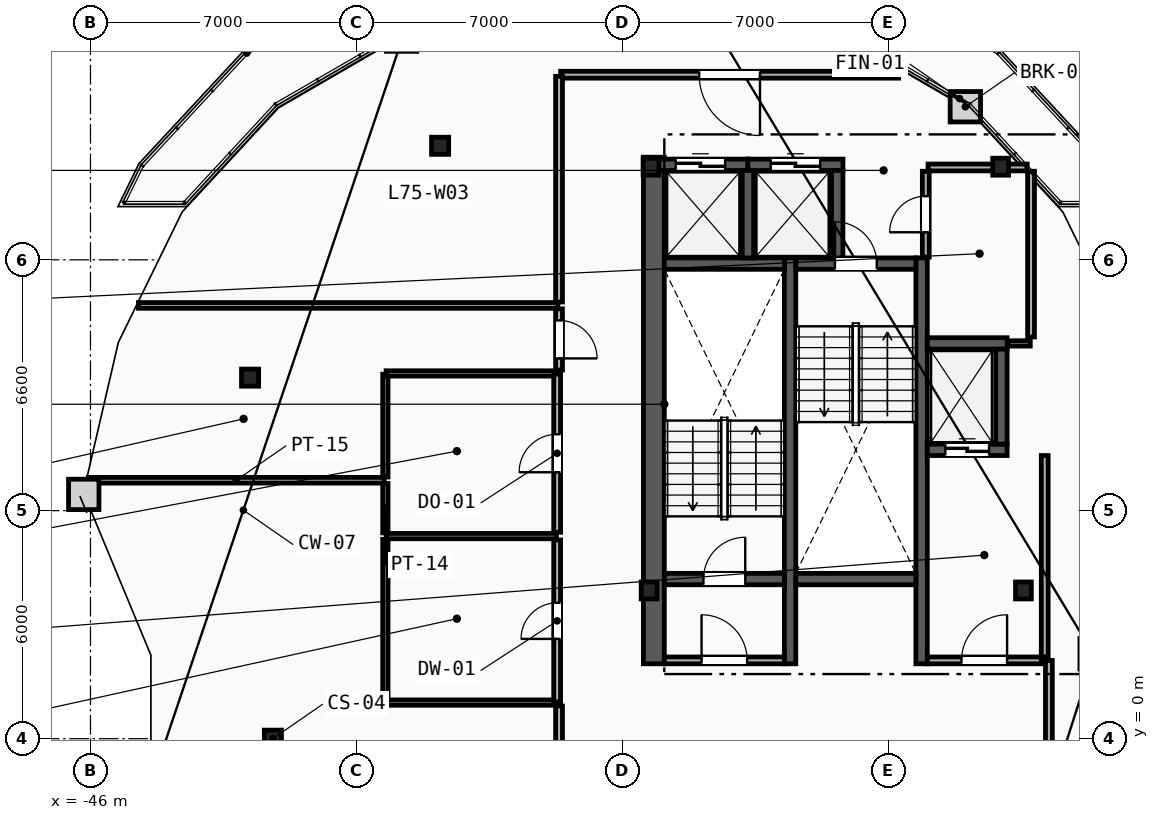
"""IFC4 building model, lengths in metres.
Left out: names, types, materials, properties, quantities, classifications, styles, units other than length and angle.
Written with IfcOpenShell. Run it as: python <this file> out.ifc"""

import sys

from ifc_helpers import new_model, si_unit, direction, frame, frame_2d, origin, origin_2d, place, context, subcontext, project, spatial, rectangle, hollow_rectangle, i_section, extrude, element, fill, save


model = new_model("IFC4")
c1 = context("Model", 3, precision=1e-05, world=origin(), true_north=direction((0.0, 1.0)))
c2 = subcontext(c1, "Body", "Model", "MODEL_VIEW")
j1 = project(units=[si_unit("LENGTHUNIT", "METRE"), si_unit("PLANEANGLEUNIT", "RADIAN")], contexts=[c1])
p1 = place(None, origin())
s1 = spatial("IfcSite", under=j1, at=p1, CompositionType="ELEMENT")
p2 = place(p1, origin())
s2 = spatial("IfcBuilding", under=s1, at=p2, CompositionType="ELEMENT")
p3 = place(p2, frame((0.0, 0.0, 282.8)))
s3 = spatial("IfcBuildingStorey", under=s2, at=p3, CompositionType="ELEMENT", Elevation=282.8)
for number, where, z_axis, x_axis in (
    (1, (-31.3, 3.9, 0.0), (0.0, 0.0, 1.0), (1.0, 0.0, 0.0)),
    (2, (-21.45, 3.9, 0.0), (0.0, 0.0, 1.0), (1.0, 0.0, 0.0)),
    (3, (-22.05, 15.05, 0.0), (0.0, 0.0, 1.0), (1.0, 0.0, 0.0)),
    (4, (-31.25, 15.05, 0.0), (0.0, 0.0, 1.0), (1.0, 0.0, 0.0)),
):
    element("IfcColumn", number, at=place(p3, frame(where, z_axis=z_axis, x_axis=x_axis)), inside=s3, PredefinedType="COLUMN", context=c2, shape_type="SweptSolid", body=[
        extrude(i_section(OverallWidth=0.416, OverallDepth=0.446, WebThickness=0.039, FlangeThickness=0.063, FilletRadius=0.018, at=origin_2d()), origin(), (0.0, 0.0, 1.0), 3.6),
    ])
for number, where, z_axis, x_axis in (
    (5, (-41.2, 0.0, 0.0), (0.0, 0.0, 1.0), (1.0, 0.0, 0.0)),
    (6, (-41.8, 9.5, 0.0), (0.0, 0.0, 1.0), (1.0, 0.0, 0.0)),
    (7, (-36.8, 15.6, 0.0), (0.0, 0.0, 1.0), (1.0, 0.0, 0.0)),
):
    element("IfcColumn", number, at=place(p3, frame(where, z_axis=z_axis, x_axis=x_axis)), inside=s3, PredefinedType="COLUMN", context=c2, shape_type="SweptSolid", body=[
        extrude(hollow_rectangle(XDim=0.45, YDim=0.45, WallThickness=0.025, at=origin_2d()), origin(), (0.0, 0.0, 1.0), 3.6),
    ])
p4 = place(p3, frame((-31.175, 1.97, 0.0), z_axis=(0.0, 0.0, 1.0), x_axis=(0.0, 1.0, 0.0)))
e8 = element("IfcWall", 8, at=p4, inside=s3, PredefinedType="SHEAR", context=c2, shape_type="SweptSolid", body=[
    extrude(rectangle(XDim=13.33, YDim=0.55, at=frame_2d((6.665, 0.0))), origin(), (0.0, 0.0, 1.0), 3.34),
])
for number, where, z_axis, x_axis in (
    (9, (-27.59, 1.97, 0.0), (0.0, 0.0, 1.0), (0.0, 1.0, 0.0)),
    (10, (-24.13, 1.97, 0.0), (0.0, 0.0, 1.0), (0.0, 1.0, 0.0)),
):
    element("IfcWall", number, at=place(p3, frame(where, z_axis=z_axis, x_axis=x_axis)), inside=s3, PredefinedType="SHEAR", context=c2, shape_type="SweptSolid", body=[
        extrude(rectangle(XDim=10.68, YDim=0.3, at=frame_2d((5.34, 0.0))), origin(), (0.0, 0.0, 1.0), 3.34),
    ])
p5 = place(p3, frame((-30.9, 4.2, 0.0), z_axis=(0.0, 0.0, 1.0), x_axis=(1.0, 0.0, 0.0)))
e11 = element("IfcWall", 11, at=p5, inside=s3, PredefinedType="SHEAR", context=c2, shape_type="SweptSolid", body=[
    extrude(rectangle(XDim=3.16, YDim=0.3, at=frame_2d((1.58, 0.0))), origin(), (0.0, 0.0, 1.0), 3.34),
])
p6 = place(p5, frame((1.03, 0.0, 0.0)))
e12 = element("IfcOpeningElement", 12, at=p6, cuts=e11, PredefinedType="OPENING", context=c2, shape_type="SweptSolid", body=[
    extrude(rectangle(XDim=1.1, YDim=2.15, at=frame_2d((0.55, 1.075))), frame((0.0, 0.16, 0.0), z_axis=(0.0, -1.0, 0.0), x_axis=(1.0, 0.0, 0.0)), (0.0, 0.0, 1.0), 0.32),
])
p7 = place(p3, frame((-30.9, 12.5, 0.0), z_axis=(0.0, 0.0, 1.0), x_axis=(1.0, 0.0, 0.0)))
e13 = element("IfcWall", 13, at=p7, inside=s3, PredefinedType="SHEAR", context=c2, shape_type="SweptSolid", body=[
    extrude(rectangle(XDim=3.16, YDim=0.3, at=frame_2d((1.58, 0.0))), origin(), (0.0, 0.0, 1.0), 3.34),
])
p8 = place(p3, frame((-27.44, 12.5, 0.0), z_axis=(0.0, 0.0, 1.0), x_axis=(1.0, 0.0, 0.0)))
e14 = element("IfcWall", 14, at=p8, inside=s3, PredefinedType="SHEAR", context=c2, shape_type="SweptSolid", body=[
    extrude(rectangle(XDim=3.16, YDim=0.3, at=frame_2d((1.58, 0.0))), origin(), (0.0, 0.0, 1.0), 3.34),
])
p9 = place(p8, frame((1.03, 0.0, 0.0)))
e15 = element("IfcOpeningElement", 15, at=p9, cuts=e14, PredefinedType="OPENING", context=c2, shape_type="SweptSolid", body=[
    extrude(rectangle(XDim=1.1, YDim=2.15, at=frame_2d((0.55, 1.075))), frame((0.0, 0.16, 0.0), z_axis=(0.0, -1.0, 0.0), x_axis=(1.0, 0.0, 0.0)), (0.0, 0.0, 1.0), 0.32),
])
p10 = place(p3, frame((-27.44, 4.2, 0.0), z_axis=(0.0, 0.0, 1.0), x_axis=(1.0, 0.0, 0.0)))
e16 = element("IfcWall", 16, at=p10, inside=s3, PredefinedType="SHEAR", context=c2, shape_type="SweptSolid", body=[
    extrude(rectangle(XDim=3.16, YDim=0.3, at=frame_2d((1.58, 0.0))), origin(), (0.0, 0.0, 1.0), 3.34),
])
p11 = place(p3, frame((-20.89, 2.15, 0.0), z_axis=(0.0, 0.0, 1.0), x_axis=(0.0, 1.0, 0.0)))
e17 = element("IfcWall", 17, at=p11, inside=s3, PredefinedType="PARTITIONING", context=c2, shape_type="SweptSolid", body=[
    extrude(rectangle(XDim=5.3, YDim=0.18, at=frame_2d((2.65, 0.0))), origin(), (0.0, 0.0, 1.0), 3.34),
])
p12 = place(p3, frame((-23.98, 2.06, 0.0), z_axis=(0.0, 0.0, 1.0), x_axis=(1.0, 0.0, 0.0)))
e18 = element("IfcWall", 18, at=p12, inside=s3, PredefinedType="PARTITIONING", context=c2, shape_type="SweptSolid", body=[
    extrude(rectangle(XDim=3.0, YDim=0.18, at=frame_2d((1.5, 0.0))), origin(), (0.0, 0.0, 1.0), 3.34),
])
p13 = place(p12, frame((0.9, 0.0, 0.0)))
e19 = element("IfcOpeningElement", 19, at=p13, cuts=e18, PredefinedType="OPENING", context=c2, shape_type="SweptSolid", body=[
    extrude(rectangle(XDim=1.2, YDim=2.15, at=frame_2d((0.6, 1.075))), frame((0.0, 0.1, 0.0), z_axis=(0.0, -1.0, 0.0), x_axis=(1.0, 0.0, 0.0)), (0.0, 0.0, 1.0), 0.2),
])
p14 = place(p3, frame((-30.9, 2.06, 0.0), z_axis=(0.0, 0.0, 1.0), x_axis=(1.0, 0.0, 0.0)))
e20 = element("IfcWall", 20, at=p14, inside=s3, PredefinedType="PARTITIONING", context=c2, shape_type="SweptSolid", body=[
    extrude(rectangle(XDim=3.16, YDim=0.18, at=frame_2d((1.58, 0.0))), origin(), (0.0, 0.0, 1.0), 3.34),
])
p15 = place(p14, frame((0.98, 0.0, 0.0)))
e21 = element("IfcOpeningElement", 21, at=p15, cuts=e20, PredefinedType="OPENING", context=c2, shape_type="SweptSolid", body=[
    extrude(rectangle(XDim=1.2, YDim=2.15, at=frame_2d((0.6, 1.075))), frame((0.0, 0.1, 0.0), z_axis=(0.0, -1.0, 0.0), x_axis=(1.0, 0.0, 0.0)), (0.0, 0.0, 1.0), 0.2),
])
p16 = place(p3, frame((-23.98, 7.6, 0.0), z_axis=(0.0, 0.0, 1.0), x_axis=(1.0, 0.0, 0.0)))
e22 = element("IfcWall", 22, at=p16, inside=s3, PredefinedType="SHEAR", context=c2, shape_type="SweptSolid", body=[
    extrude(rectangle(XDim=2.1, YDim=0.3, at=frame_2d((1.05, 0.0))), origin(), (0.0, 0.0, 1.0), 3.34),
])
p17 = place(p16, frame((0.475, 0.0, 0.0)))
e23 = element("IfcOpeningElement", 23, at=p17, cuts=e22, PredefinedType="OPENING", context=c2, shape_type="SweptSolid", body=[
    extrude(rectangle(XDim=1.15, YDim=2.2, at=frame_2d((0.575, 1.1))), frame((0.0, 0.16, 0.0), z_axis=(0.0, -1.0, 0.0), x_axis=(1.0, 0.0, 0.0)), (0.0, 0.0, 1.0), 0.32),
])
p18 = place(p3, frame((-23.98, 10.4, 0.0), z_axis=(0.0, 0.0, 1.0), x_axis=(1.0, 0.0, 0.0)))
e24 = element("IfcWall", 24, at=p18, inside=s3, PredefinedType="SHEAR", context=c2, shape_type="SweptSolid", body=[
    extrude(rectangle(XDim=2.1, YDim=0.3, at=frame_2d((1.05, 0.0))), origin(), (0.0, 0.0, 1.0), 3.34),
])
p19 = place(p3, frame((-22.03, 7.75, 0.0), z_axis=(0.0, 0.0, 1.0), x_axis=(0.0, 1.0, 0.0)))
e25 = element("IfcWall", 25, at=p19, inside=s3, PredefinedType="SHEAR", context=c2, shape_type="SweptSolid", body=[
    extrude(rectangle(XDim=2.5, YDim=0.3, at=frame_2d((1.25, 0.0))), origin(), (0.0, 0.0, 1.0), 3.34),
])
p20 = place(p3, frame((-31.2, 15.1, 0.0), z_axis=(0.0, 0.0, 1.0), x_axis=(1.0, 0.0, 0.0)))
e26 = element("IfcWall", 26, at=p20, inside=s3, PredefinedType="SHEAR", context=c2, shape_type="SweptSolid", body=[
    extrude(rectangle(XDim=2.5, YDim=0.3, at=frame_2d((1.25, 0.0))), origin(), (0.0, 0.0, 1.0), 3.34),
])
p21 = place(p20, frame((0.6, 0.0, 0.0)))
e27 = element("IfcOpeningElement", 27, at=p21, cuts=e26, PredefinedType="OPENING", context=c2, shape_type="SweptSolid", body=[
    extrude(rectangle(XDim=1.3, YDim=2.2, at=frame_2d((0.65, 1.1))), frame((0.0, 0.16, 0.0), z_axis=(0.0, -1.0, 0.0), x_axis=(1.0, 0.0, 0.0)), (0.0, 0.0, 1.0), 0.32),
])
p22 = place(p3, frame((-28.7, 12.65, 0.0), z_axis=(0.0, 0.0, 1.0), x_axis=(0.0, 1.0, 0.0)))
e28 = element("IfcWall", 28, at=p22, inside=s3, PredefinedType="SHEAR", context=c2, shape_type="SweptSolid", body=[
    extrude(rectangle(XDim=2.3, YDim=0.3, at=frame_2d((1.15, 0.0))), origin(), (0.0, 0.0, 1.0), 3.34),
])
p23 = place(p3, frame((-28.7, 15.1, 0.0), z_axis=(0.0, 0.0, 1.0), x_axis=(1.0, 0.0, 0.0)))
e29 = element("IfcWall", 29, at=p23, inside=s3, PredefinedType="SHEAR", context=c2, shape_type="SweptSolid", body=[
    extrude(rectangle(XDim=2.5, YDim=0.3, at=frame_2d((1.25, 0.0))), origin(), (0.0, 0.0, 1.0), 3.34),
])
p24 = place(p23, frame((0.6, 0.0, 0.0)))
e30 = element("IfcOpeningElement", 30, at=p24, cuts=e29, PredefinedType="OPENING", context=c2, shape_type="SweptSolid", body=[
    extrude(rectangle(XDim=1.3, YDim=2.2, at=frame_2d((0.65, 1.1))), frame((0.0, 0.16, 0.0), z_axis=(0.0, -1.0, 0.0), x_axis=(1.0, 0.0, 0.0)), (0.0, 0.0, 1.0), 0.32),
])
p25 = place(p3, frame((-26.35, 12.65, 0.0), z_axis=(0.0, 0.0, 1.0), x_axis=(0.0, 1.0, 0.0)))
e31 = element("IfcWall", 31, at=p25, inside=s3, PredefinedType="SHEAR", context=c2, shape_type="SweptSolid", body=[
    extrude(rectangle(XDim=2.3, YDim=0.3, at=frame_2d((1.15, 0.0))), origin(), (0.0, 0.0, 1.0), 3.34),
])
p26 = place(p3, frame((-21.86, 10.4, 0.0), z_axis=(0.0, 0.0, 1.0), x_axis=(1.0, 0.0, 0.0)))
e32 = element("IfcWall", 32, at=p26, inside=s3, PredefinedType="PARTITIONING", context=c2, shape_type="SweptSolid", body=[
    extrude(rectangle(XDim=0.59, YDim=0.14, at=frame_2d((0.295, 0.0))), origin(), (0.0, 0.0, 1.0), 3.34),
])
p27 = place(p3, frame((-21.25, 10.57, 0.0), z_axis=(0.0, 0.0, 1.0), x_axis=(0.0, 1.0, 0.0)))
e33 = element("IfcWall", 33, at=p27, inside=s3, PredefinedType="PARTITIONING", context=c2, shape_type="SweptSolid", body=[
    extrude(rectangle(XDim=4.36, YDim=0.18, at=frame_2d((2.18, 0.0))), origin(), (0.0, 0.0, 1.0), 3.34),
])
p28 = place(p3, frame((-23.96, 15.03, 0.0), z_axis=(0.0, 0.0, 1.0), x_axis=(1.0, 0.0, 0.0)))
e34 = element("IfcWall", 34, at=p28, inside=s3, PredefinedType="PARTITIONING", context=c2, shape_type="SweptSolid", body=[
    extrude(rectangle(XDim=2.61, YDim=0.18, at=frame_2d((1.305, 0.0))), origin(), (0.0, 0.0, 1.0), 2.413),
])
p29 = place(p3, frame((-24.02, 12.67, 0.0), z_axis=(0.0, 0.0, 1.0), x_axis=(0.0, 1.0, 0.0)))
e35 = element("IfcWall", 35, at=p29, inside=s3, PredefinedType="PARTITIONING", context=c2, shape_type="SweptSolid", body=[
    extrude(rectangle(XDim=2.26, YDim=0.18, at=frame_2d((1.13, 0.0))), origin(), (0.0, 0.0, 1.0), 3.34),
])
p30 = place(p29, frame((0.655, 0.0, 0.0)))
e36 = element("IfcOpeningElement", 36, at=p30, cuts=e35, PredefinedType="OPENING", context=c2, shape_type="SweptSolid", body=[
    extrude(rectangle(XDim=0.95, YDim=2.1, at=frame_2d((0.475, 1.05))), frame((0.0, 0.1, 0.0), z_axis=(0.0, -1.0, 0.0), x_axis=(1.0, 0.0, 0.0)), (0.0, 0.0, 1.0), 0.2),
])
p31 = place(p3, frame((-38.24, 0.97, 0.0), z_axis=(0.0, 0.0, 1.0), x_axis=(0.0, 1.0, 0.0)))
e37 = element("IfcWall", 37, at=p31, inside=s3, PredefinedType="PARTITIONING", context=c2, shape_type="SweptSolid", body=[
    extrude(rectangle(XDim=4.275, YDim=0.14, at=frame_2d((2.138, 0.0))), origin(), (0.0, 0.0, 1.0), 3.34),
])
p32 = place(p3, frame((-38.24, 5.415, 0.0), z_axis=(0.0, 0.0, 1.0), x_axis=(0.0, 1.0, 0.0)))
e38 = element("IfcWall", 38, at=p32, inside=s3, PredefinedType="PARTITIONING", context=c2, shape_type="SweptSolid", body=[
    extrude(rectangle(XDim=1.3, YDim=0.14, at=frame_2d((0.65, 0.0))), origin(), (0.0, 0.0, 1.0), 3.34),
])
p33 = place(p3, frame((-38.24, 6.885, 0.0), z_axis=(0.0, 0.0, 1.0), x_axis=(0.0, 1.0, 0.0)))
e39 = element("IfcWall", 39, at=p33, inside=s3, PredefinedType="PARTITIONING", context=c2, shape_type="SweptSolid", body=[
    extrude(rectangle(XDim=2.705, YDim=0.14, at=frame_2d((1.353, 0.0))), origin(), (0.0, 0.0, 1.0), 3.34),
])
for number, where, z_axis, x_axis in (
    (40, (-38.22, 0.95, 0.0), (0.0, 0.0, 1.0), (1.0, 0.0, 0.0)),
    (41, (-38.22, 5.33, 0.0), (0.0, 0.0, 1.0), (1.0, 0.0, 0.0)),
    (42, (-38.22, 9.61, 0.0), (0.0, 0.0, 1.0), (1.0, 0.0, 0.0)),
):
    element("IfcWall", number, at=place(p3, frame(where, z_axis=z_axis, x_axis=x_axis)), inside=s3, PredefinedType="PARTITIONING", context=c2, shape_type="SweptSolid", body=[
        extrude(rectangle(XDim=4.48, YDim=0.14, at=frame_2d((2.24, 0.0))), origin(), (0.0, 0.0, 1.0), 3.34),
    ])
p34 = place(p3, frame((-33.72, 0.97, 0.0), z_axis=(0.0, 0.0, 1.0), x_axis=(0.0, 1.0, 0.0)))
e43 = element("IfcWall", 43, at=p34, inside=s3, PredefinedType="PARTITIONING", context=c2, shape_type="SweptSolid", body=[
    extrude(rectangle(XDim=4.26, YDim=0.18, at=frame_2d((2.13, 0.0))), origin(), (0.0, 0.0, 1.0), 3.34),
])
p35 = place(p34, frame((1.655, 0.0, 0.0)))
e44 = element("IfcOpeningElement", 44, at=p35, cuts=e43, PredefinedType="OPENING", context=c2, shape_type="SweptSolid", body=[
    extrude(rectangle(XDim=0.95, YDim=2.1, at=frame_2d((0.475, 1.05))), frame((0.0, 0.1, 0.0), z_axis=(0.0, -1.0, 0.0), x_axis=(1.0, 0.0, 0.0)), (0.0, 0.0, 1.0), 0.2),
])
p36 = place(p3, frame((-33.72, 5.43, 0.0), z_axis=(0.0, 0.0, 1.0), x_axis=(0.0, 1.0, 0.0)))
e45 = element("IfcWall", 45, at=p36, inside=s3, PredefinedType="PARTITIONING", context=c2, shape_type="SweptSolid", body=[
    extrude(rectangle(XDim=4.16, YDim=0.18, at=frame_2d((2.08, 0.0))), origin(), (0.0, 0.0, 1.0), 3.34),
])
p37 = place(p36, frame((1.58, 0.0, 0.0)))
e46 = element("IfcOpeningElement", 46, at=p37, cuts=e45, PredefinedType="OPENING", context=c2, shape_type="SweptSolid", body=[
    extrude(rectangle(XDim=1.0, YDim=2.15, at=frame_2d((0.5, 1.075))), frame((0.0, 0.1, 0.0), z_axis=(0.0, -1.0, 0.0), x_axis=(1.0, 0.0, 0.0)), (0.0, 0.0, 1.0), 0.2),
])
p38 = place(p3, frame((-46.058, 6.8, 0.0), z_axis=(0.0, 0.0, 1.0), x_axis=(1.0, 0.0, 0.0)))
e47 = element("IfcWall", 47, at=p38, inside=s3, PredefinedType="PARTITIONING", context=c2, shape_type="SweptSolid", body=[
    extrude(rectangle(XDim=7.788, YDim=0.15, at=frame_2d((3.894, 0.0))), origin(), (0.0, 0.0, 1.0), 3.34),
])
p39 = place(p3, frame((-44.737, 11.4, 0.0), z_axis=(0.0, 0.0, 1.0), x_axis=(1.0, 0.0, 0.0)))
e48 = element("IfcWall", 48, at=p39, inside=s3, PredefinedType="PARTITIONING", context=c2, shape_type="SweptSolid", body=[
    extrude(rectangle(XDim=11.037, YDim=0.15, at=frame_2d((5.519, 0.0))), origin(), (0.0, 0.0, 1.0), 3.34),
])
p40 = place(p3, frame((-20.78, -0.329, 0.0), z_axis=(0.0, 0.0, 1.0), x_axis=(0.0, 1.0, 0.0)))
e49 = element("IfcWall", 49, at=p40, inside=s3, PredefinedType="PARTITIONING", context=c2, shape_type="SweptSolid", body=[
    extrude(rectangle(XDim=2.387, YDim=0.18, at=frame_2d((1.194, 0.0))), origin(), (0.0, 0.0, 1.0), 3.34),
])
p41 = place(p3, frame((-33.67, 0.859, 0.0), z_axis=(0.0, 0.0, 1.0), x_axis=(0.0, -1.0, 0.0)))
e50 = element("IfcWall", 50, at=p41, inside=s3, PredefinedType="PARTITIONING", context=c2, shape_type="SweptSolid", body=[
    extrude(rectangle(XDim=1.187, YDim=0.18, at=frame_2d((0.594, 0.0))), origin(), (0.0, 0.0, 1.0), 3.34),
])
p42 = place(p3, frame((-33.67, 11.31, 0.0), z_axis=(0.0, 0.0, 1.0), x_axis=(0.0, -1.0, 0.0)))
e51 = element("IfcWall", 51, at=p42, inside=s3, PredefinedType="PARTITIONING", context=c2, shape_type="SweptSolid", body=[
    extrude(rectangle(XDim=1.609, YDim=0.18, at=frame_2d((0.804, 0.0))), origin(), (0.0, 0.0, 1.0), 3.34),
])
p43 = place(p42, frame((0.304, 0.0, 0.0)))
e52 = element("IfcOpeningElement", 52, at=p43, cuts=e51, PredefinedType="OPENING", context=c2, shape_type="SweptSolid", body=[
    extrude(rectangle(XDim=1.0, YDim=2.15, at=frame_2d((0.5, 1.075))), frame((0.0, 0.1, 0.0), z_axis=(0.0, -1.0, 0.0), x_axis=(1.0, 0.0, 0.0)), (0.0, 0.0, 1.0), 0.2),
])
p44 = place(p3, frame((-24.736, 17.47, 0.0), z_axis=(0.0, 0.0, 1.0), x_axis=(-1.0, 0.0, 0.0)))
e53 = element("IfcWall", 53, at=p44, inside=s3, PredefinedType="PARTITIONING", context=c2, shape_type="SweptSolid", body=[
    extrude(rectangle(XDim=8.892, YDim=0.18, at=frame_2d((4.446, 0.0))), origin(), (0.0, 0.0, 1.0), 3.34),
])
p45 = place(p44, frame((3.646, 0.0, 0.0)))
e54 = element("IfcOpeningElement", 54, at=p45, cuts=e53, PredefinedType="OPENING", context=c2, shape_type="SweptSolid", body=[
    extrude(rectangle(XDim=1.6, YDim=2.2, at=frame_2d((0.8, 1.1))), frame((0.0, 0.1, 0.0), z_axis=(0.0, -1.0, 0.0), x_axis=(1.0, 0.0, 0.0)), (0.0, 0.0, 1.0), 0.2),
])
p46 = place(p3, frame((-33.67, 17.428, 0.0), z_axis=(0.0, 0.0, 1.0), x_axis=(0.0, -1.0, 0.0)))
e55 = element("IfcWall", 55, at=p46, inside=s3, PredefinedType="PARTITIONING", context=c2, shape_type="SweptSolid", body=[
    extrude(rectangle(XDim=5.938, YDim=0.18, at=frame_2d((2.969, 0.0))), origin(), (0.0, 0.0, 1.0), 3.34),
])
p47 = place(p6, origin())
e56 = element("IfcDoor", 56, at=p47, inside=s3, OperationType="SINGLE_SWING_RIGHT", PredefinedType="DOOR", context=c2, shape_type="SweptSolid", body=[
    extrude(rectangle(XDim=1.1, YDim=2.15, at=frame_2d((0.55, 1.075))), frame((0.0, 0.025, 0.0), z_axis=(0.0, -1.0, 0.0), x_axis=(1.0, 0.0, 0.0)), (0.0, 0.0, 1.0), 0.05),
])
fill(e12, e56)
p48 = place(p9, origin())
e57 = element("IfcDoor", 57, at=p48, inside=s3, OperationType="SINGLE_SWING_LEFT", PredefinedType="DOOR", context=c2, shape_type="SweptSolid", body=[
    extrude(rectangle(XDim=1.1, YDim=2.15, at=frame_2d((0.55, 1.075))), frame((0.0, 0.025, 0.0), z_axis=(0.0, -1.0, 0.0), x_axis=(1.0, 0.0, 0.0)), (0.0, 0.0, 1.0), 0.05),
])
fill(e15, e57)
p49 = place(p13, origin())
e58 = element("IfcDoor", 58, at=p49, inside=s3, OperationType="SINGLE_SWING_RIGHT", PredefinedType="DOOR", context=c2, shape_type="SweptSolid", body=[
    extrude(rectangle(XDim=1.2, YDim=2.15, at=frame_2d((0.6, 1.075))), frame((0.0, 0.025, 0.0), z_axis=(0.0, -1.0, 0.0), x_axis=(1.0, 0.0, 0.0)), (0.0, 0.0, 1.0), 0.05),
])
fill(e19, e58)
p50 = place(p15, origin())
e59 = element("IfcDoor", 59, at=p50, inside=s3, OperationType="SINGLE_SWING_LEFT", PredefinedType="DOOR", context=c2, shape_type="SweptSolid", body=[
    extrude(rectangle(XDim=1.2, YDim=2.15, at=frame_2d((0.6, 1.075))), frame((0.0, 0.025, 0.0), z_axis=(0.0, -1.0, 0.0), x_axis=(1.0, 0.0, 0.0)), (0.0, 0.0, 1.0), 0.05),
])
fill(e21, e59)
p51 = place(p17, origin())
e60 = element("IfcDoor", 60, at=p51, inside=s3, OperationType="SLIDING_TO_LEFT", PredefinedType="TRAPDOOR", context=c2, shape_type="SweptSolid", body=[
    extrude(rectangle(XDim=1.15, YDim=2.2, at=frame_2d((0.575, 1.1))), frame((0.0, 0.025, 0.0), z_axis=(0.0, -1.0, 0.0), x_axis=(1.0, 0.0, 0.0)), (0.0, 0.0, 1.0), 0.05),
])
fill(e23, e60)
p52 = place(p21, origin())
e61 = element("IfcDoor", 61, at=p52, inside=s3, OperationType="SLIDING_TO_LEFT", PredefinedType="TRAPDOOR", context=c2, shape_type="SweptSolid", body=[
    extrude(rectangle(XDim=1.3, YDim=2.2, at=frame_2d((0.65, 1.1))), frame((0.0, 0.025, 0.0), z_axis=(0.0, -1.0, 0.0), x_axis=(1.0, 0.0, 0.0)), (0.0, 0.0, 1.0), 0.05),
])
fill(e27, e61)
p53 = place(p24, origin())
e62 = element("IfcDoor", 62, at=p53, inside=s3, OperationType="SLIDING_TO_LEFT", PredefinedType="TRAPDOOR", context=c2, shape_type="SweptSolid", body=[
    extrude(rectangle(XDim=1.3, YDim=2.2, at=frame_2d((0.65, 1.1))), frame((0.0, 0.025, 0.0), z_axis=(0.0, -1.0, 0.0), x_axis=(1.0, 0.0, 0.0)), (0.0, 0.0, 1.0), 0.05),
])
fill(e30, e62)
p54 = place(p45, origin())
e63 = element("IfcDoor", 63, at=p54, inside=s3, OperationType="SINGLE_SWING_LEFT", PredefinedType="DOOR", context=c2, shape_type="SweptSolid", body=[
    extrude(rectangle(XDim=1.6, YDim=2.2, at=frame_2d((0.8, 1.1))), frame((0.0, 0.025, 0.0), z_axis=(0.0, -1.0, 0.0), x_axis=(1.0, 0.0, 0.0)), (0.0, 0.0, 1.0), 0.05),
])
fill(e54, e63)
p55 = place(p35, origin())
e64 = element("IfcDoor", 64, at=p55, inside=s3, OperationType="SINGLE_SWING_LEFT", PredefinedType="DOOR", context=c2, shape_type="SweptSolid", body=[
    extrude(rectangle(XDim=0.95, YDim=2.1, at=frame_2d((0.475, 1.05))), frame((0.0, 0.025, 0.0), z_axis=(0.0, -1.0, 0.0), x_axis=(1.0, 0.0, 0.0)), (0.0, 0.0, 1.0), 0.05),
])
fill(e44, e64)
p56 = place(p37, origin())
e65 = element("IfcDoor", 65, at=p56, inside=s3, OperationType="SINGLE_SWING_LEFT", PredefinedType="DOOR", context=c2, shape_type="SweptSolid", body=[
    extrude(rectangle(XDim=1.0, YDim=2.15, at=frame_2d((0.5, 1.075))), frame((0.0, 0.025, 0.0), z_axis=(0.0, -1.0, 0.0), x_axis=(1.0, 0.0, 0.0)), (0.0, 0.0, 1.0), 0.05),
])
fill(e46, e65)
p57 = place(p30, origin())
e66 = element("IfcDoor", 66, at=p57, inside=s3, OperationType="SINGLE_SWING_LEFT", PredefinedType="DOOR", context=c2, shape_type="SweptSolid", body=[
    extrude(rectangle(XDim=0.95, YDim=2.1, at=frame_2d((0.475, 1.05))), frame((0.0, 0.025, 0.0), z_axis=(0.0, -1.0, 0.0), x_axis=(1.0, 0.0, 0.0)), (0.0, 0.0, 1.0), 0.05),
])
fill(e36, e66)
p58 = place(p43, origin())
e67 = element("IfcDoor", 67, at=p58, inside=s3, OperationType="SINGLE_SWING_RIGHT", PredefinedType="DOOR", context=c2, shape_type="SweptSolid", body=[
    extrude(rectangle(XDim=1.0, YDim=2.15, at=frame_2d((0.5, 1.075))), frame((0.0, 0.025, 0.0), z_axis=(0.0, -1.0, 0.0), x_axis=(1.0, 0.0, 0.0)), (0.0, 0.0, 1.0), 0.05),
])
fill(e52, e67)
save(model, sys.argv[1])
